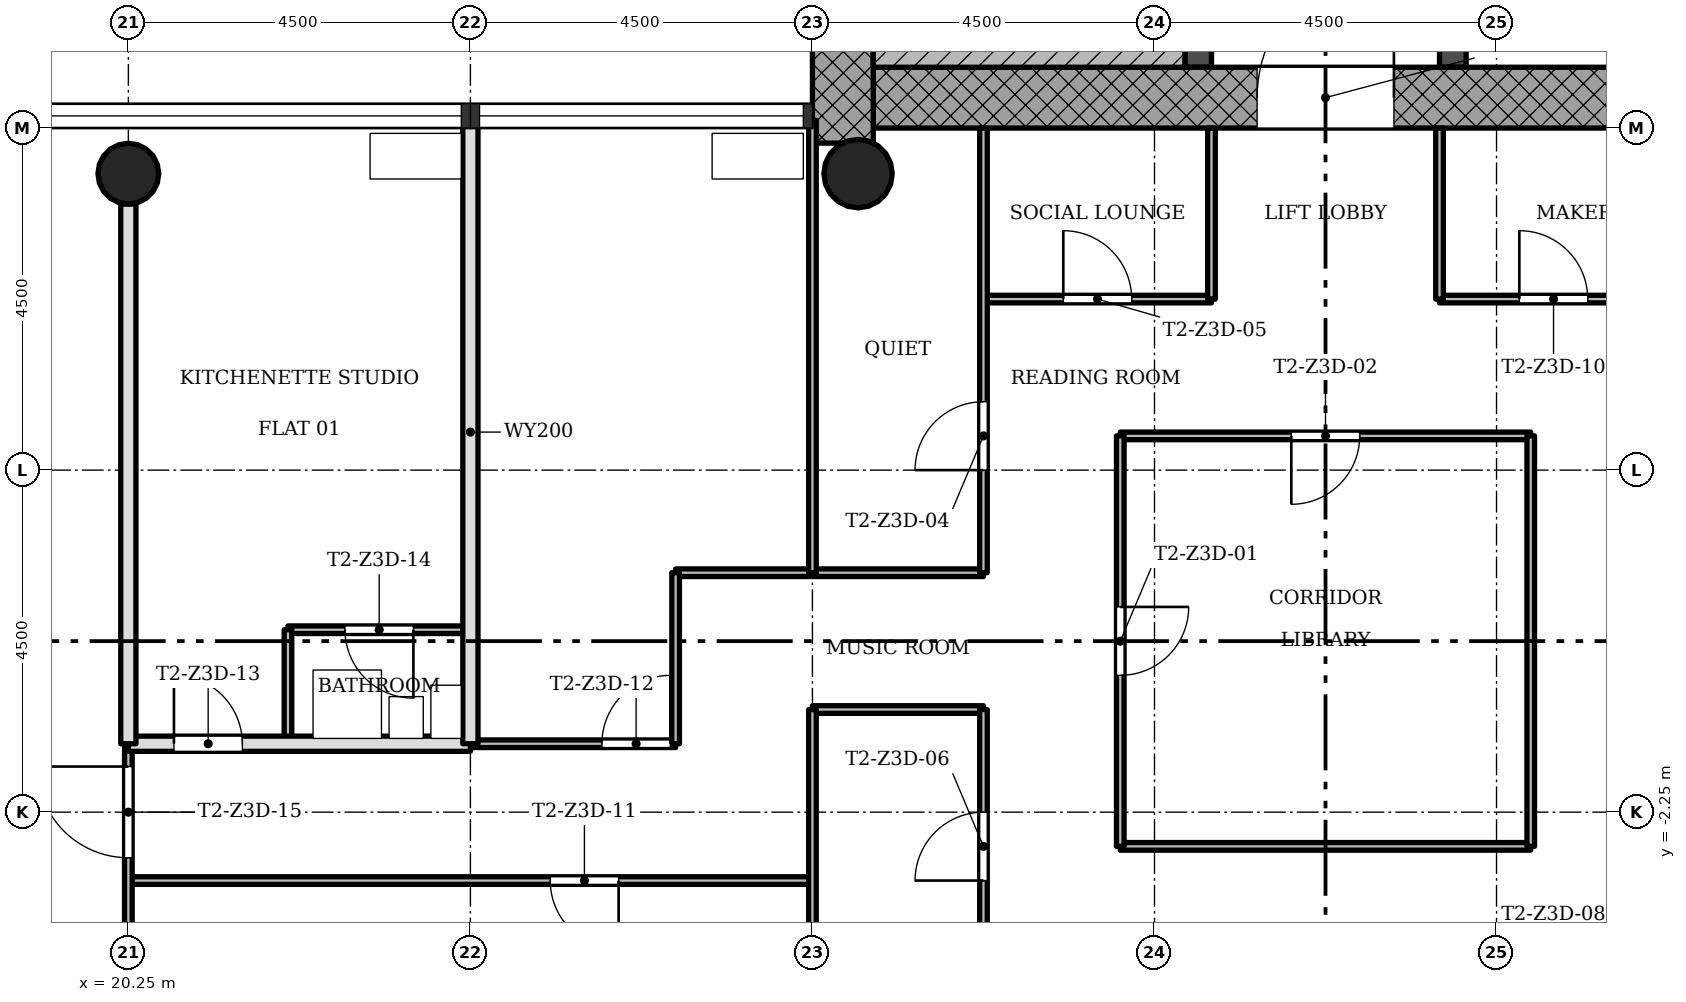
"""IFC4 building model, lengths in metres.
Left out: names, types, materials, properties, quantities, classifications, styles, units other than length and angle.
Written with IfcOpenShell. Run it as: python <this file> out.ifc"""

import sys

from ifc_helpers import new_model, si_unit, direction, frame, frame_2d, origin, origin_2d, place, context, subcontext, project, spatial, rectangle, hollow_circle, extrude, element, fill, save


model = new_model("IFC4")
c1 = context("Model", 3, precision=1e-05, world=origin(), true_north=direction((0.0, 1.0)))
c2 = subcontext(c1, "Body", "Model", "MODEL_VIEW")
j1 = project(units=[si_unit("LENGTHUNIT", "METRE"), si_unit("PLANEANGLEUNIT", "RADIAN")], contexts=[c1])
p1 = place(None, origin())
s1 = spatial("IfcSite", under=j1, at=p1, CompositionType="ELEMENT")
p2 = place(p1, origin())
s2 = spatial("IfcBuilding", under=s1, at=p2, CompositionType="ELEMENT")
p3 = place(p2, frame((0.0, 0.0, 174.5)))
s3 = spatial("IfcBuildingStorey", under=s2, at=p3, CompositionType="ELEMENT", Elevation=174.5)
p4 = place(p3, frame((30.05, 7.15, 0.0), z_axis=(0.0, 0.0, 1.0), x_axis=(1.0, 0.0, 0.0)))
e1 = element("IfcWall", 1, at=p4, inside=s3, PredefinedType="SHEAR", context=c2, shape_type="SweptSolid", body=[
    extrude(rectangle(XDim=12.7, YDim=0.8, at=frame_2d((6.35, 0.0))), origin(), (0.0, 0.0, 1.0), 3.4),
])
p5 = place(p4, frame((5.05, 0.0, 0.0)))
e2 = element("IfcOpeningElement", 2, at=p5, cuts=e1, PredefinedType="OPENING", context=c2, shape_type="SweptSolid", body=[
    extrude(rectangle(XDim=1.8, YDim=2.1, at=frame_2d((0.9, 1.05))), frame((0.0, 0.41, 0.0), z_axis=(0.0, -1.0, 0.0), x_axis=(1.0, 0.0, 0.0)), (0.0, 0.0, 1.0), 0.82),
])
p6 = place(p3, frame((29.65, 15.348, 0.0), z_axis=(0.0, 0.0, 1.0), x_axis=(0.0, -1.0, 0.0)))
e3 = element("IfcWall", 3, at=p6, inside=s3, PredefinedType="SHEAR", context=c2, shape_type="SweptSolid", body=[
    extrude(rectangle(XDim=8.796, YDim=0.8, at=frame_2d((4.398, 0.0))), origin(), (0.0, 0.0, 1.0), 3.4),
])
p7 = place(p3, frame((34.325, 7.55, 0.0), z_axis=(0.0, 0.0, 1.0), x_axis=(0.0, 1.0, 0.0)))
e4 = element("IfcWall", 4, at=p7, inside=s3, PredefinedType="SHEAR", context=c2, shape_type="SweptSolid", body=[
    extrude(rectangle(XDim=7.4, YDim=0.35, at=frame_2d((3.7, 0.0))), origin(), (0.0, 0.0, 1.0), 3.4),
])
p8 = place(p7, frame((0.85, 0.0, 0.0)))
e5 = element("IfcOpeningElement", 5, at=p8, cuts=e4, PredefinedType="OPENING", context=c2, shape_type="SweptSolid", body=[
    extrude(rectangle(XDim=0.9, YDim=2.1, at=frame_2d((0.45, 1.05))), frame((0.0, 0.185, 0.0), z_axis=(0.0, -1.0, 0.0), x_axis=(1.0, 0.0, 0.0)), (0.0, 0.0, 1.0), 0.37),
])
p9 = place(p3, frame((37.675, 7.55, 0.0), z_axis=(0.0, 0.0, 1.0), x_axis=(0.0, 1.0, 0.0)))
e6 = element("IfcWall", 6, at=p9, inside=s3, PredefinedType="SHEAR", context=c2, shape_type="SweptSolid", body=[
    extrude(rectangle(XDim=7.4, YDim=0.35, at=frame_2d((3.7, 0.0))), origin(), (0.0, 0.0, 1.0), 3.4),
])
p10 = place(p9, frame((0.95, 0.0, 0.0)))
e7 = element("IfcOpeningElement", 7, at=p10, cuts=e6, PredefinedType="OPENING", context=c2, shape_type="SweptSolid", body=[
    extrude(rectangle(XDim=1.1, YDim=2.1, at=frame_2d((0.55, 1.05))), frame((0.0, 0.185, 0.0), z_axis=(0.0, -1.0, 0.0), x_axis=(1.0, 0.0, 0.0)), (0.0, 0.0, 1.0), 0.37),
])
p11 = place(p9, frame((3.15, 0.0, 0.0)))
e8 = element("IfcOpeningElement", 8, at=p11, cuts=e6, PredefinedType="OPENING", context=c2, shape_type="SweptSolid", body=[
    extrude(rectangle(XDim=1.1, YDim=2.1, at=frame_2d((0.55, 1.05))), frame((0.0, 0.185, 0.0), z_axis=(0.0, -1.0, 0.0), x_axis=(1.0, 0.0, 0.0)), (0.0, 0.0, 1.0), 0.37),
])
p12 = place(p9, frame((5.35, 0.0, 0.0)))
e9 = element("IfcOpeningElement", 9, at=p12, cuts=e6, PredefinedType="OPENING", context=c2, shape_type="SweptSolid", body=[
    extrude(rectangle(XDim=1.1, YDim=2.1, at=frame_2d((0.55, 1.05))), frame((0.0, 0.185, 0.0), z_axis=(0.0, -1.0, 0.0), x_axis=(1.0, 0.0, 0.0)), (0.0, 0.0, 1.0), 0.37),
])
p13 = place(p3, frame((20.25, 6.15, 0.0), z_axis=(0.0, 0.0, 1.0), x_axis=(1.0, 0.0, 0.0)))
e10 = element("IfcColumn", 10, at=p13, inside=s3, PredefinedType="COLUMN", context=c2, shape_type="SweptSolid", body=[
    extrude(hollow_circle(Radius=0.4, WallThickness=0.028, at=origin_2d()), origin(), (0.0, 0.0, 1.0), 3.4),
])
p14 = place(p3, frame((29.85, 6.15, 0.0), z_axis=(0.0, 0.0, 1.0), x_axis=(1.0, 0.0, 0.0)))
e11 = element("IfcColumn", 11, at=p14, inside=s3, PredefinedType="COLUMN", context=c2, shape_type="SweptSolid", body=[
    extrude(hollow_circle(Radius=0.45, WallThickness=0.032, at=origin_2d()), origin(), (0.0, 0.0, 1.0), 3.4),
])
p15 = place(p3, frame((29.25, -3.15, 0.0), z_axis=(0.0, 0.0, 1.0), x_axis=(-1.0, 0.0, 0.0)))
e12 = element("IfcWall", 12, at=p15, inside=s3, PredefinedType="PARTITIONING", context=c2, shape_type="SweptSolid", body=[
    extrude(rectangle(XDim=9.0, YDim=0.1, at=frame_2d((4.5, 0.0))), origin(), (0.0, 0.0, 1.0), 3.0),
])
p16 = place(p15, frame((2.55, 0.0, 0.0)))
e13 = element("IfcOpeningElement", 13, at=p16, cuts=e12, PredefinedType="OPENING", context=c2, shape_type="SweptSolid", body=[
    extrude(rectangle(XDim=0.9, YDim=2.1, at=frame_2d((0.45, 1.05))), frame((0.0, 0.06, 0.0), z_axis=(0.0, -1.0, 0.0), x_axis=(1.0, 0.0, 0.0)), (0.0, 0.0, 1.0), 0.12),
])
p17 = place(p3, frame((38.7, -2.7, 0.0), z_axis=(0.0, 0.0, 1.0), x_axis=(-1.0, 0.0, 0.0)))
e14 = element("IfcWall", 14, at=p17, inside=s3, PredefinedType="PARTITIONING", context=c2, shape_type="SweptSolid", body=[
    extrude(rectangle(XDim=5.4, YDim=0.1, at=frame_2d((2.7, 0.0))), origin(), (0.0, 0.0, 1.0), 3.0),
])
p18 = place(p3, frame((27.45, -1.35, 0.0), z_axis=(0.0, 0.0, 1.0), x_axis=(-1.0, 0.0, 0.0)))
e15 = element("IfcWall", 15, at=p18, inside=s3, PredefinedType="PARTITIONING", context=c2, shape_type="SweptSolid", body=[
    extrude(rectangle(XDim=2.7, YDim=0.1, at=frame_2d((1.35, 0.0))), origin(), (0.0, 0.0, 1.0), 3.0),
])
p19 = place(p18, frame((0.07, 0.0, 0.0)))
e16 = element("IfcOpeningElement", 16, at=p19, cuts=e15, PredefinedType="OPENING", context=c2, shape_type="SweptSolid", body=[
    extrude(rectangle(XDim=0.9, YDim=2.1, at=frame_2d((0.45, 1.05))), frame((0.0, 0.06, 0.0), z_axis=(0.0, -1.0, 0.0), x_axis=(1.0, 0.0, 0.0)), (0.0, 0.0, 1.0), 0.12),
])
p20 = place(p3, frame((24.75, -1.35, 0.0), z_axis=(0.0, 0.0, 1.0), x_axis=(-1.0, 0.0, 0.0)))
e17 = element("IfcWall", 17, at=p20, inside=s3, PredefinedType="SOLIDWALL", context=c2, shape_type="SweptSolid", body=[
    extrude(rectangle(XDim=4.5, YDim=0.2, at=frame_2d((2.25, 0.0))), origin(), (0.0, 0.0, 1.0), 3.0),
])
p21 = place(p20, frame((3.0, 0.0, 0.0)))
e18 = element("IfcOpeningElement", 18, at=p21, cuts=e17, PredefinedType="OPENING", context=c2, shape_type="SweptSolid", body=[
    extrude(rectangle(XDim=0.9, YDim=2.1, at=frame_2d((0.45, 1.05))), frame((0.0, 0.11, 0.0), z_axis=(0.0, -1.0, 0.0), x_axis=(1.0, 0.0, 0.0)), (0.0, 0.0, 1.0), 0.22),
])
p22 = place(p3, frame((31.5, -0.9, 0.0), z_axis=(0.0, 0.0, 1.0), x_axis=(-1.0, 0.0, 0.0)))
e19 = element("IfcWall", 19, at=p22, inside=s3, PredefinedType="PARTITIONING", context=c2, shape_type="SweptSolid", body=[
    extrude(rectangle(XDim=2.25, YDim=0.1, at=frame_2d((1.125, 0.0))), origin(), (0.0, 0.0, 1.0), 3.0),
])
p23 = place(p3, frame((24.75, 0.15, 0.0), z_axis=(0.0, 0.0, 1.0), x_axis=(-1.0, 0.0, 0.0)))
e20 = element("IfcWall", 20, at=p23, inside=s3, PredefinedType="PARTITIONING", context=c2, shape_type="SweptSolid", body=[
    extrude(rectangle(XDim=2.4, YDim=0.1, at=frame_2d((1.2, 0.0))), origin(), (0.0, 0.0, 1.0), 3.0),
])
p24 = place(p23, frame((0.75, 0.0, 0.0)))
e21 = element("IfcOpeningElement", 21, at=p24, cuts=e20, PredefinedType="OPENING", context=c2, shape_type="SweptSolid", body=[
    extrude(rectangle(XDim=0.9, YDim=2.1, at=frame_2d((0.45, 1.05))), frame((0.0, 0.06, 0.0), z_axis=(0.0, -1.0, 0.0), x_axis=(1.0, 0.0, 0.0)), (0.0, 0.0, 1.0), 0.12),
])
p25 = place(p3, frame((31.5, 0.9, 0.0), z_axis=(0.0, 0.0, 1.0), x_axis=(-1.0, 0.0, 0.0)))
e22 = element("IfcWall", 22, at=p25, inside=s3, PredefinedType="PARTITIONING", context=c2, shape_type="SweptSolid", body=[
    extrude(rectangle(XDim=4.05, YDim=0.1, at=frame_2d((2.025, 0.0))), origin(), (0.0, 0.0, 1.0), 3.0),
])
p26 = place(p3, frame((38.7, 2.7, 0.0), z_axis=(0.0, 0.0, 1.0), x_axis=(-1.0, 0.0, 0.0)))
e23 = element("IfcWall", 23, at=p26, inside=s3, PredefinedType="PARTITIONING", context=c2, shape_type="SweptSolid", body=[
    extrude(rectangle(XDim=5.4, YDim=0.1, at=frame_2d((2.7, 0.0))), origin(), (0.0, 0.0, 1.0), 3.0),
])
p27 = place(p26, frame((2.25, 0.0, 0.0)))
e24 = element("IfcOpeningElement", 24, at=p27, cuts=e23, PredefinedType="OPENING", context=c2, shape_type="SweptSolid", body=[
    extrude(rectangle(XDim=0.9, YDim=2.1, at=frame_2d((0.45, 1.05))), frame((0.0, 0.06, 0.0), z_axis=(0.0, -1.0, 0.0), x_axis=(1.0, 0.0, 0.0)), (0.0, 0.0, 1.0), 0.12),
])
p28 = place(p3, frame((42.75, 4.5, 0.0), z_axis=(0.0, 0.0, 1.0), x_axis=(-1.0, 0.0, 0.0)))
e25 = element("IfcWall", 25, at=p28, inside=s3, PredefinedType="PARTITIONING", context=c2, shape_type="SweptSolid", body=[
    extrude(rectangle(XDim=5.25, YDim=0.1, at=frame_2d((2.625, 0.0))), origin(), (0.0, 0.0, 1.0), 3.0),
])
p29 = place(p28, frame((3.3, 0.0, 0.0)))
e26 = element("IfcOpeningElement", 26, at=p29, cuts=e25, PredefinedType="OPENING", context=c2, shape_type="SweptSolid", body=[
    extrude(rectangle(XDim=0.9, YDim=2.1, at=frame_2d((0.45, 1.05))), frame((0.0, 0.06, 0.0), z_axis=(0.0, -1.0, 0.0), x_axis=(1.0, 0.0, 0.0)), (0.0, 0.0, 1.0), 0.12),
])
p30 = place(p3, frame((34.5, 4.5, 0.0), z_axis=(0.0, 0.0, 1.0), x_axis=(-1.0, 0.0, 0.0)))
e27 = element("IfcWall", 27, at=p30, inside=s3, PredefinedType="PARTITIONING", context=c2, shape_type="SweptSolid", body=[
    extrude(rectangle(XDim=3.0, YDim=0.1, at=frame_2d((1.5, 0.0))), origin(), (0.0, 0.0, 1.0), 3.0),
])
p31 = place(p30, frame((1.05, 0.0, 0.0)))
e28 = element("IfcOpeningElement", 28, at=p31, cuts=e27, PredefinedType="OPENING", context=c2, shape_type="SweptSolid", body=[
    extrude(rectangle(XDim=0.9, YDim=2.1, at=frame_2d((0.45, 1.05))), frame((0.0, 0.06, 0.0), z_axis=(0.0, -1.0, 0.0), x_axis=(1.0, 0.0, 0.0)), (0.0, 0.0, 1.0), 0.12),
])
p32 = place(p3, frame((38.7, -2.7, 0.0), z_axis=(0.0, 0.0, 1.0), x_axis=(0.0, 1.0, 0.0)))
e29 = element("IfcWall", 29, at=p32, inside=s3, PredefinedType="PARTITIONING", context=c2, shape_type="SweptSolid", body=[
    extrude(rectangle(XDim=5.4, YDim=0.1, at=frame_2d((2.7, 0.0))), origin(), (0.0, 0.0, 1.0), 3.0),
])
for number, where, z_axis, x_axis in (
    (30, (37.5, 4.5, 0.0), (0.0, 0.0, 1.0), (0.0, 1.0, 0.0)),
    (31, (34.5, 4.5, 0.0), (0.0, 0.0, 1.0), (0.0, 1.0, 0.0)),
):
    element("IfcWall", number, at=place(p3, frame(where, z_axis=z_axis, x_axis=x_axis)), inside=s3, PredefinedType="PARTITIONING", context=c2, shape_type="SweptSolid", body=[
        extrude(rectangle(XDim=2.25, YDim=0.1, at=frame_2d((1.125, 0.0))), origin(), (0.0, 0.0, 1.0), 3.0),
    ])
p33 = place(p3, frame((33.3, -2.7, 0.0), z_axis=(0.0, 0.0, 1.0), x_axis=(0.0, 1.0, 0.0)))
e32 = element("IfcWall", 32, at=p33, inside=s3, PredefinedType="PARTITIONING", context=c2, shape_type="SweptSolid", body=[
    extrude(rectangle(XDim=5.4, YDim=0.1, at=frame_2d((2.7, 0.0))), origin(), (0.0, 0.0, 1.0), 3.0),
])
p34 = place(p33, frame((2.25, 0.0, 0.0)))
e33 = element("IfcOpeningElement", 33, at=p34, cuts=e32, PredefinedType="OPENING", context=c2, shape_type="SweptSolid", body=[
    extrude(rectangle(XDim=0.9, YDim=2.1, at=frame_2d((0.45, 1.05))), frame((0.0, 0.06, 0.0), z_axis=(0.0, -1.0, 0.0), x_axis=(1.0, 0.0, 0.0)), (0.0, 0.0, 1.0), 0.12),
])
p35 = place(p3, frame((31.5, -4.5, 0.0), z_axis=(0.0, 0.0, 1.0), x_axis=(0.0, 1.0, 0.0)))
e34 = element("IfcWall", 34, at=p35, inside=s3, PredefinedType="PARTITIONING", context=c2, shape_type="SweptSolid", body=[
    extrude(rectangle(XDim=3.6, YDim=0.1, at=frame_2d((1.8, 0.0))), origin(), (0.0, 0.0, 1.0), 3.0),
])
p36 = place(p35, frame((1.35, 0.0, 0.0)))
e35 = element("IfcOpeningElement", 35, at=p36, cuts=e34, PredefinedType="OPENING", context=c2, shape_type="SweptSolid", body=[
    extrude(rectangle(XDim=0.9, YDim=2.1, at=frame_2d((0.45, 1.05))), frame((0.0, 0.06, 0.0), z_axis=(0.0, -1.0, 0.0), x_axis=(1.0, 0.0, 0.0)), (0.0, 0.0, 1.0), 0.12),
])
p37 = place(p3, frame((31.5, 0.9, 0.0), z_axis=(0.0, 0.0, 1.0), x_axis=(0.0, 1.0, 0.0)))
e36 = element("IfcWall", 36, at=p37, inside=s3, PredefinedType="PARTITIONING", context=c2, shape_type="SweptSolid", body=[
    extrude(rectangle(XDim=5.85, YDim=0.1, at=frame_2d((2.925, 0.0))), origin(), (0.0, 0.0, 1.0), 3.0),
])
p38 = place(p37, frame((1.35, 0.0, 0.0)))
e37 = element("IfcOpeningElement", 37, at=p38, cuts=e36, PredefinedType="OPENING", context=c2, shape_type="SweptSolid", body=[
    extrude(rectangle(XDim=0.9, YDim=2.1, at=frame_2d((0.45, 1.05))), frame((0.0, 0.06, 0.0), z_axis=(0.0, -1.0, 0.0), x_axis=(1.0, 0.0, 0.0)), (0.0, 0.0, 1.0), 0.12),
])
for number, where, z_axis, x_axis in (
    (38, (29.25, -6.85, 0.0), (0.0, 0.0, 1.0), (0.0, 1.0, 0.0)),
    (39, (29.25, 0.9, 0.0), (0.0, 0.0, 1.0), (0.0, 1.0, 0.0)),
):
    element("IfcWall", number, at=place(p3, frame(where, z_axis=z_axis, x_axis=x_axis)), inside=s3, PredefinedType="PARTITIONING", context=c2, shape_type="SweptSolid", body=[
        extrude(rectangle(XDim=5.95, YDim=0.1, at=frame_2d((2.975, 0.0))), origin(), (0.0, 0.0, 1.0), 3.0),
    ])
p39 = place(p3, frame((27.45, -1.35, 0.0), z_axis=(0.0, 0.0, 1.0), x_axis=(0.0, 1.0, 0.0)))
e40 = element("IfcWall", 40, at=p39, inside=s3, PredefinedType="PARTITIONING", context=c2, shape_type="SweptSolid", body=[
    extrude(rectangle(XDim=2.25, YDim=0.1, at=frame_2d((1.125, 0.0))), origin(), (0.0, 0.0, 1.0), 3.0),
])
p40 = place(p3, frame((24.75, -1.35, 0.0), z_axis=(0.0, 0.0, 1.0), x_axis=(0.0, 1.0, 0.0)))
e41 = element("IfcWall", 41, at=p40, inside=s3, PredefinedType="SOLIDWALL", context=c2, shape_type="SweptSolid", body=[
    extrude(rectangle(XDim=8.2, YDim=0.2, at=frame_2d((4.1, 0.0))), origin(), (0.0, 0.0, 1.0), 3.0),
])
p41 = place(p3, frame((22.35, -1.35, 0.0), z_axis=(0.0, 0.0, 1.0), x_axis=(0.0, 1.0, 0.0)))
e42 = element("IfcWall", 42, at=p41, inside=s3, PredefinedType="PARTITIONING", context=c2, shape_type="SweptSolid", body=[
    extrude(rectangle(XDim=1.5, YDim=0.1, at=frame_2d((0.75, 0.0))), origin(), (0.0, 0.0, 1.0), 3.0),
])
p42 = place(p3, frame((20.25, -5.75, 0.0), z_axis=(0.0, 0.0, 1.0), x_axis=(0.0, 1.0, 0.0)))
e43 = element("IfcWall", 43, at=p42, inside=s3, PredefinedType="PARTITIONING", context=c2, shape_type="SweptSolid", body=[
    extrude(rectangle(XDim=4.4, YDim=0.1, at=frame_2d((2.2, 0.0))), origin(), (0.0, 0.0, 1.0), 3.0),
])
p43 = place(p42, frame((2.9, 0.0, 0.0)))
e44 = element("IfcOpeningElement", 44, at=p43, cuts=e43, PredefinedType="OPENING", context=c2, shape_type="SweptSolid", body=[
    extrude(rectangle(XDim=1.2, YDim=2.1, at=frame_2d((0.6, 1.05))), frame((0.0, 0.06, 0.0), z_axis=(0.0, -1.0, 0.0), x_axis=(1.0, 0.0, 0.0)), (0.0, 0.0, 1.0), 0.12),
])
p44 = place(p3, frame((20.25, -1.35, 0.0), z_axis=(0.0, 0.0, 1.0), x_axis=(0.0, 1.0, 0.0)))
e45 = element("IfcWall", 45, at=p44, inside=s3, PredefinedType="SOLIDWALL", context=c2, shape_type="SweptSolid", body=[
    extrude(rectangle(XDim=7.1, YDim=0.2, at=frame_2d((3.55, 0.0))), origin(), (0.0, 0.0, 1.0), 3.0),
])
p45 = place(p3, frame((34.15, 7.75, 0.0), z_axis=(0.0, 0.0, 1.0), x_axis=(-1.0, 0.0, 0.0)))
e46 = element("IfcWall", 46, at=p45, inside=s3, PredefinedType="SHEAR", context=c2, shape_type="SweptSolid", body=[
    extrude(rectangle(XDim=4.1, YDim=0.4, at=frame_2d((2.05, 0.0))), origin(), (0.0, 0.0, 1.0), 3.4),
])
p46 = place(p34, origin())
e47 = element("IfcDoor", 47, at=p46, inside=s3, OperationType="SINGLE_SWING_RIGHT", PredefinedType="DOOR", context=c2, shape_type="SweptSolid", body=[
    extrude(rectangle(XDim=0.9, YDim=2.1, at=frame_2d((0.45, 1.05))), frame((0.0, 0.025, 0.0), z_axis=(0.0, -1.0, 0.0), x_axis=(1.0, 0.0, 0.0)), (0.0, 0.0, 1.0), 0.05),
])
fill(e33, e47)
p47 = place(p27, origin())
e48 = element("IfcDoor", 48, at=p47, inside=s3, OperationType="SINGLE_SWING_LEFT", PredefinedType="DOOR", context=c2, shape_type="SweptSolid", body=[
    extrude(rectangle(XDim=0.9, YDim=2.1, at=frame_2d((0.45, 1.05))), frame((0.0, 0.025, 0.0), z_axis=(0.0, -1.0, 0.0), x_axis=(1.0, 0.0, 0.0)), (0.0, 0.0, 1.0), 0.05),
])
fill(e24, e48)
p48 = place(p38, origin())
e49 = element("IfcDoor", 49, at=p48, inside=s3, OperationType="SINGLE_SWING_RIGHT", PredefinedType="DOOR", context=c2, shape_type="SweptSolid", body=[
    extrude(rectangle(XDim=0.9, YDim=2.1, at=frame_2d((0.45, 1.05))), frame((0.0, 0.025, 0.0), z_axis=(0.0, -1.0, 0.0), x_axis=(1.0, 0.0, 0.0)), (0.0, 0.0, 1.0), 0.05),
])
fill(e37, e49)
p49 = place(p31, origin())
e50 = element("IfcDoor", 50, at=p49, inside=s3, OperationType="SINGLE_SWING_RIGHT", PredefinedType="DOOR", context=c2, shape_type="SweptSolid", body=[
    extrude(rectangle(XDim=0.9, YDim=2.1, at=frame_2d((0.45, 1.05))), frame((0.0, 0.025, 0.0), z_axis=(0.0, -1.0, 0.0), x_axis=(1.0, 0.0, 0.0)), (0.0, 0.0, 1.0), 0.05),
])
fill(e28, e50)
p50 = place(p36, origin())
e51 = element("IfcDoor", 51, at=p50, inside=s3, OperationType="SINGLE_SWING_RIGHT", PredefinedType="DOOR", context=c2, shape_type="SweptSolid", body=[
    extrude(rectangle(XDim=0.9, YDim=2.1, at=frame_2d((0.45, 1.05))), frame((0.0, 0.025, 0.0), z_axis=(0.0, -1.0, 0.0), x_axis=(1.0, 0.0, 0.0)), (0.0, 0.0, 1.0), 0.05),
])
fill(e35, e51)
p51 = place(p29, origin())
e52 = element("IfcDoor", 52, at=p51, inside=s3, OperationType="SINGLE_SWING_RIGHT", PredefinedType="DOOR", context=c2, shape_type="SweptSolid", body=[
    extrude(rectangle(XDim=0.9, YDim=2.1, at=frame_2d((0.45, 1.05))), frame((0.0, 0.025, 0.0), z_axis=(0.0, -1.0, 0.0), x_axis=(1.0, 0.0, 0.0)), (0.0, 0.0, 1.0), 0.05),
])
fill(e26, e52)
p52 = place(p16, origin())
e53 = element("IfcDoor", 53, at=p52, inside=s3, OperationType="SINGLE_SWING_RIGHT", PredefinedType="DOOR", context=c2, shape_type="SweptSolid", body=[
    extrude(rectangle(XDim=0.9, YDim=2.1, at=frame_2d((0.45, 1.05))), frame((0.0, 0.025, 0.0), z_axis=(0.0, -1.0, 0.0), x_axis=(1.0, 0.0, 0.0)), (0.0, 0.0, 1.0), 0.05),
])
fill(e13, e53)
p53 = place(p19, origin())
e54 = element("IfcDoor", 54, at=p53, inside=s3, OperationType="SINGLE_SWING_LEFT", PredefinedType="DOOR", context=c2, shape_type="SweptSolid", body=[
    extrude(rectangle(XDim=0.9, YDim=2.1, at=frame_2d((0.45, 1.05))), frame((0.0, 0.025, 0.0), z_axis=(0.0, -1.0, 0.0), x_axis=(1.0, 0.0, 0.0)), (0.0, 0.0, 1.0), 0.05),
])
fill(e16, e54)
p54 = place(p21, origin())
e55 = element("IfcDoor", 55, at=p54, inside=s3, OperationType="SINGLE_SWING_RIGHT", PredefinedType="DOOR", context=c2, shape_type="SweptSolid", body=[
    extrude(rectangle(XDim=0.9, YDim=2.1, at=frame_2d((0.45, 1.05))), frame((0.0, 0.025, 0.0), z_axis=(0.0, -1.0, 0.0), x_axis=(1.0, 0.0, 0.0)), (0.0, 0.0, 1.0), 0.05),
])
fill(e18, e55)
p55 = place(p24, origin())
e56 = element("IfcDoor", 56, at=p55, inside=s3, OperationType="SINGLE_SWING_RIGHT", PredefinedType="DOOR", context=c2, shape_type="SweptSolid", body=[
    extrude(rectangle(XDim=0.9, YDim=2.1, at=frame_2d((0.45, 1.05))), frame((0.0, 0.025, 0.0), z_axis=(0.0, -1.0, 0.0), x_axis=(1.0, 0.0, 0.0)), (0.0, 0.0, 1.0), 0.05),
])
fill(e21, e56)
p56 = place(p43, origin())
e57 = element("IfcDoor", 57, at=p56, inside=s3, OperationType="SINGLE_SWING_LEFT", PredefinedType="DOOR", context=c2, shape_type="SweptSolid", body=[
    extrude(rectangle(XDim=1.2, YDim=2.1, at=frame_2d((0.6, 1.05))), frame((0.0, 0.025, 0.0), z_axis=(0.0, -1.0, 0.0), x_axis=(1.0, 0.0, 0.0)), (0.0, 0.0, 1.0), 0.05),
])
fill(e44, e57)
p57 = place(p5, origin())
e58 = element("IfcDoor", 58, at=p57, inside=s3, OperationType="SINGLE_SWING_LEFT", PredefinedType="DOOR", context=c2, shape_type="SweptSolid", body=[
    extrude(rectangle(XDim=1.8, YDim=2.1, at=frame_2d((0.9, 1.05))), frame((0.0, 0.025, 0.0), z_axis=(0.0, -1.0, 0.0), x_axis=(1.0, 0.0, 0.0)), (0.0, 0.0, 1.0), 0.05),
])
fill(e2, e58)
save(model, sys.argv[1])
